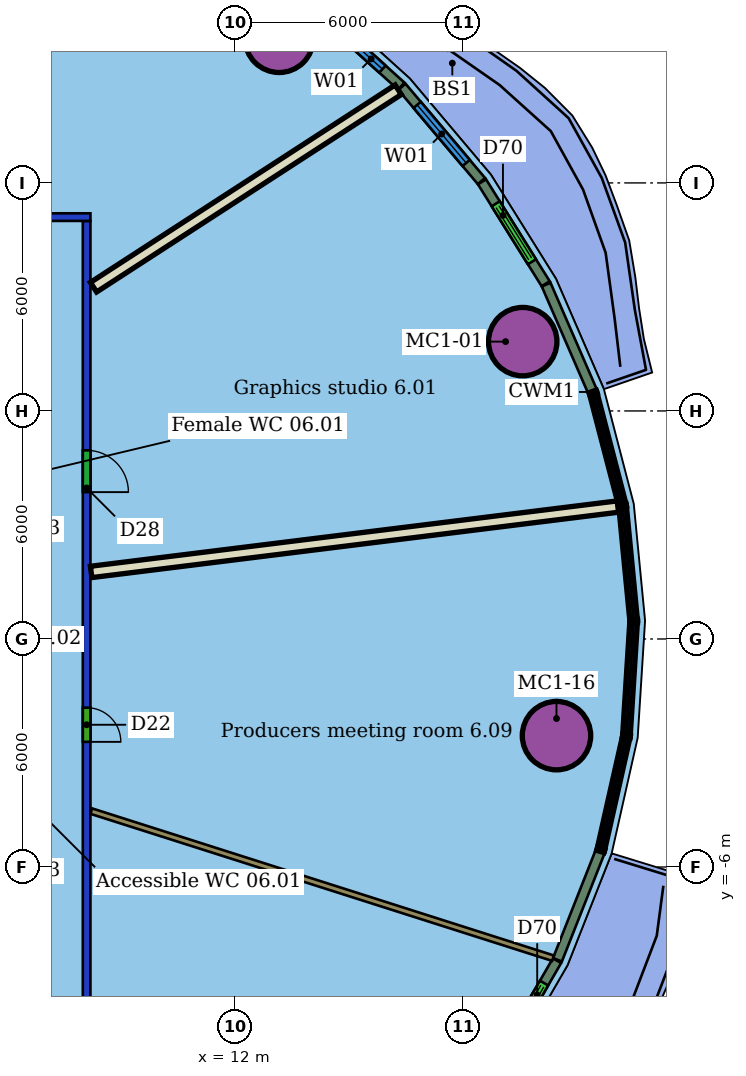
"""IFC4 building model, lengths in metres.
Left out: names, types, materials, properties, quantities, classifications, styles, units other than length and angle.
Written with IfcOpenShell. Run it as: python <this file> out.ifc"""

import sys

from ifc_helpers import new_model, si_unit, direction, frame, frame_2d, origin, origin_2d, place, context, subcontext, project, spatial, rectangle, hollow_circle, extrude, element, fill, save


model = new_model("IFC4")
c1 = context("Model", 3, precision=1e-05, world=origin(), true_north=direction((0.0, 1.0)))
c2 = subcontext(c1, "Body", "Model", "MODEL_VIEW")
j1 = project(units=[si_unit("LENGTHUNIT", "METRE"), si_unit("PLANEANGLEUNIT", "RADIAN")], contexts=[c1])
p1 = place(None, origin())
s1 = spatial("IfcSite", under=j1, at=p1, CompositionType="ELEMENT")
p2 = place(p1, origin())
s2 = spatial("IfcBuilding", under=s1, at=p2, CompositionType="ELEMENT")
p3 = place(p2, frame((0.0, 0.0, 39.7)))
s3 = spatial("IfcBuildingStorey", under=s2, at=p3, CompositionType="ELEMENT", Elevation=39.7)
for number, where, z_axis, x_axis in (
    (1, (19.575, 7.824, 0.0), (0.0, 0.0, 1.0), (1.0, 0.0, 0.0)),
    (2, (13.166, 15.805, 0.0), (0.0, 0.0, 1.0), (1.0, 0.0, 0.0)),
    (3, (20.464, -2.543, 0.0), (0.0, 0.0, 1.0), (1.0, 0.0, 0.0)),
):
    element("IfcColumn", number, at=place(p3, frame(where, z_axis=z_axis, x_axis=x_axis)), inside=s3, PredefinedType="COLUMN", context=c2, shape_type="SweptSolid", body=[
        extrude(hollow_circle(Radius=0.9, WallThickness=0.06, at=origin_2d()), origin(), (0.0, 0.0, 1.0), 3.55),
    ])
p4 = place(p3, frame((-20.2, 11.1, 0.0), z_axis=(0.0, 0.0, 1.0), x_axis=(1.0, 0.0, 0.0)))
e4 = element("IfcWall", 4, at=p4, inside=s3, PredefinedType="PARTITIONING", context=c2, shape_type="SweptSolid", body=[
    extrude(rectangle(XDim=28.4, YDim=0.2, at=frame_2d((14.2, 0.0))), origin(), (0.0, 0.0, 1.0), 2.85),
])
p5 = place(p4, frame((16.718, 0.0, 0.0)))
e5 = element("IfcOpeningElement", 5, at=p5, cuts=e4, PredefinedType="OPENING", context=c2, shape_type="SweptSolid", body=[
    extrude(rectangle(XDim=1.8, YDim=2.1, at=frame_2d((0.9, 1.05))), frame((0.0, 0.11, 0.0), z_axis=(0.0, -1.0, 0.0), x_axis=(1.0, 0.0, 0.0)), (0.0, 0.0, 1.0), 0.22),
])
p6 = place(p4, frame((9.305, 0.0, 0.0)))
e6 = element("IfcOpeningElement", 6, at=p6, cuts=e4, PredefinedType="OPENING", context=c2, shape_type="SweptSolid", body=[
    extrude(rectangle(XDim=1.0, YDim=2.1, at=frame_2d((0.5, 1.05))), frame((0.0, 0.11, 0.0), z_axis=(0.0, -1.0, 0.0), x_axis=(1.0, 0.0, 0.0)), (0.0, 0.0, 1.0), 0.22),
])
p7 = place(p4, frame((4.326, 0.0, 0.0)))
e7 = element("IfcOpeningElement", 7, at=p7, cuts=e4, PredefinedType="OPENING", context=c2, shape_type="SweptSolid", body=[
    extrude(rectangle(XDim=1.8, YDim=2.1, at=frame_2d((0.9, 1.05))), frame((0.0, 0.11, 0.0), z_axis=(0.0, -1.0, 0.0), x_axis=(1.0, 0.0, 0.0)), (0.0, 0.0, 1.0), 0.22),
])
p8 = place(p3, frame((8.1, 11.0, 0.0), z_axis=(0.0, 0.0, 1.0), x_axis=(0.0, -1.0, 0.0)))
e8 = element("IfcWall", 8, at=p8, inside=s3, PredefinedType="PARTITIONING", context=c2, shape_type="SweptSolid", body=[
    extrude(rectangle(XDim=22.0, YDim=0.2, at=frame_2d((11.0, 0.0))), origin(), (0.0, 0.0, 1.0), 2.85),
])
p9 = place(p8, frame((6.036, 0.0, 0.0)))
e9 = element("IfcOpeningElement", 9, at=p9, cuts=e8, PredefinedType="OPENING", context=c2, shape_type="SweptSolid", body=[
    extrude(rectangle(XDim=1.1, YDim=2.1, at=frame_2d((0.55, 1.05))), frame((0.0, 0.11, 0.0), z_axis=(0.0, -1.0, 0.0), x_axis=(1.0, 0.0, 0.0)), (0.0, 0.0, 1.0), 0.22),
])
p10 = place(p8, frame((12.807, 0.0, 0.0)))
e10 = element("IfcOpeningElement", 10, at=p10, cuts=e8, PredefinedType="OPENING", context=c2, shape_type="SweptSolid", body=[
    extrude(rectangle(XDim=0.9, YDim=2.1, at=frame_2d((0.45, 1.05))), frame((0.0, 0.11, 0.0), z_axis=(0.0, -1.0, 0.0), x_axis=(1.0, 0.0, 0.0)), (0.0, 0.0, 1.0), 0.22),
])
p11 = place(p3, frame((22.079, 3.484, 0.0), z_axis=(0.0, 0.0, 1.0), x_axis=(-0.992390679807, -0.123128951237, 0.0)))
e11 = element("IfcWall", 11, at=p11, inside=s3, PredefinedType="PARTITIONING", context=c2, shape_type="SweptSolid", body=[
    extrude(rectangle(XDim=13.967, YDim=0.3, at=frame_2d((6.983, 0.0))), origin(), (0.0, 0.0, 1.0), 3.55),
])
p12 = place(p3, frame((16.299, 14.452, 0.0), z_axis=(0.0, 0.0, 1.0), x_axis=(-0.839170912844, -0.54386779555, 0.0)))
e12 = element("IfcWall", 12, at=p12, inside=s3, PredefinedType="PARTITIONING", context=c2, shape_type="SweptSolid", body=[
    extrude(rectangle(XDim=9.554, YDim=0.3, at=frame_2d((4.777, 0.0))), origin(), (0.0, 0.0, 1.0), 3.55),
])
p13 = place(p3, frame((20.372, -8.399, 0.0), z_axis=(0.0, 0.0, 1.0), x_axis=(-0.95285006043, 0.303441530346, 0.0)))
e13 = element("IfcWall", 13, at=p13, inside=s3, PredefinedType="PARTITIONING", context=c2, shape_type="SweptSolid", body=[
    extrude(rectangle(XDim=12.751, YDim=0.15, at=frame_2d((6.375, 0.0))), origin(), (0.0, 0.0, 1.0), 3.55),
])
p14 = place(p3, frame((21.406, 6.526, 0.0), z_axis=(0.0, 0.0, 1.0), x_axis=(-0.398117264061, 0.917334532249, 0.0)))
e14 = element("IfcWall", 14, at=p14, inside=s3, PredefinedType="SOLIDWALL", context=c2, shape_type="SweptSolid", body=[
    extrude(rectangle(XDim=3.05, YDim=0.25, at=frame_2d((1.525, 0.0))), origin(), (0.0, 0.0, 1.0), 3.15),
])
p15 = place(p3, frame((20.18, 9.347, 0.0), z_axis=(0.0, 0.0, 1.0), x_axis=(-0.529936462225, 0.848037349416, 0.0)))
e15 = element("IfcWall", 15, at=p15, inside=s3, PredefinedType="SOLIDWALL", context=c2, shape_type="SweptSolid", body=[
    extrude(rectangle(XDim=3.161, YDim=0.25, at=frame_2d((1.581, 0.0))), origin(), (0.0, 0.0, 1.0), 3.15),
])
p16 = place(p15, frame((0.681, 0.0, 0.0)))
e16 = element("IfcOpeningElement", 16, at=p16, cuts=e15, PredefinedType="OPENING", context=c2, shape_type="SweptSolid", body=[
    extrude(rectangle(XDim=1.8, YDim=2.4, at=frame_2d((0.9, 1.2))), frame((0.0, 0.135, 0.0), z_axis=(0.0, -1.0, 0.0), x_axis=(1.0, 0.0, 0.0)), (0.0, 0.0, 1.0), 0.27),
])
p17 = place(p3, frame((18.489, 12.049, 0.0), z_axis=(0.0, 0.0, 1.0), x_axis=(-0.644879179912, 0.76428453034, 0.0)))
e17 = element("IfcWall", 17, at=p17, inside=s3, PredefinedType="SOLIDWALL", context=c2, shape_type="SweptSolid", body=[
    extrude(rectangle(XDim=3.245, YDim=0.25, at=frame_2d((1.623, 0.0))), origin(), (0.0, 0.0, 1.0), 3.15),
])
p18 = place(p17, frame((0.622, 0.0, 0.8)))
e18 = element("IfcOpeningElement", 18, at=p18, cuts=e17, PredefinedType="OPENING", context=c2, shape_type="SweptSolid", body=[
    extrude(rectangle(XDim=2.0, YDim=2.2, at=frame_2d((1.0, 1.1))), frame((0.0, 0.135, 0.0), z_axis=(0.0, -1.0, 0.0), x_axis=(1.0, 0.0, 0.0)), (0.0, 0.0, 1.0), 0.27),
])
p19 = place(p3, frame((16.379, 14.547, 0.0), z_axis=(0.0, 0.0, 1.0), x_axis=(-0.741993404353, 0.670407180672, 0.0)))
e19 = element("IfcWall", 19, at=p19, inside=s3, PredefinedType="SOLIDWALL", context=c2, shape_type="SweptSolid", body=[
    extrude(rectangle(XDim=3.335, YDim=0.25, at=frame_2d((1.668, 0.0))), origin(), (0.0, 0.0, 1.0), 3.15),
])
p20 = place(p19, frame((0.668, 0.0, 0.8)))
e20 = element("IfcOpeningElement", 20, at=p20, cuts=e19, PredefinedType="OPENING", context=c2, shape_type="SweptSolid", body=[
    extrude(rectangle(XDim=2.0, YDim=2.2, at=frame_2d((1.0, 1.1))), frame((0.0, 0.135, 0.0), z_axis=(0.0, -1.0, 0.0), x_axis=(1.0, 0.0, 0.0)), (0.0, 0.0, 1.0), 0.27),
])
p21 = place(p3, frame((18.894, -11.2, 0.0), z_axis=(0.0, 0.0, 1.0), x_axis=(0.501203693301, 0.86532933489, 0.0)))
e21 = element("IfcWall", 21, at=p21, inside=s3, PredefinedType="SOLIDWALL", context=c2, shape_type="SweptSolid", body=[
    extrude(rectangle(XDim=3.161, YDim=0.25, at=frame_2d((1.581, 0.0))), origin(), (0.0, 0.0, 1.0), 3.15),
])
p22 = place(p21, frame((0.681, 0.0, 0.0)))
e22 = element("IfcOpeningElement", 22, at=p22, cuts=e21, PredefinedType="OPENING", context=c2, shape_type="SweptSolid", body=[
    extrude(rectangle(XDim=1.8, YDim=2.4, at=frame_2d((0.9, 1.2))), frame((0.0, 0.135, 0.0), z_axis=(0.0, -1.0, 0.0), x_axis=(1.0, 0.0, 0.0)), (0.0, 0.0, 1.0), 0.27),
])
p23 = place(p3, frame((20.49, -8.441, 0.0), z_axis=(0.0, 0.0, 1.0), x_axis=(0.367150133135, 0.93016169548, 0.0)))
e23 = element("IfcWall", 23, at=p23, inside=s3, PredefinedType="SOLIDWALL", context=c2, shape_type="SweptSolid", body=[
    extrude(rectangle(XDim=3.05, YDim=0.25, at=frame_2d((1.525, 0.0))), origin(), (0.0, 0.0, 1.0), 3.15),
])
p24 = place(p9, origin())
e24 = element("IfcDoor", 24, at=p24, inside=s3, OperationType="SINGLE_SWING_RIGHT", PredefinedType="DOOR", context=c2, shape_type="SweptSolid", body=[
    extrude(rectangle(XDim=1.1, YDim=2.1, at=frame_2d((0.55, 1.05))), frame((0.0, 0.025, 0.0), z_axis=(0.0, -1.0, 0.0), x_axis=(1.0, 0.0, 0.0)), (0.0, 0.0, 1.0), 0.05),
])
fill(e9, e24)
p25 = place(p10, origin())
e25 = element("IfcDoor", 25, at=p25, inside=s3, OperationType="SINGLE_SWING_RIGHT", PredefinedType="DOOR", context=c2, shape_type="SweptSolid", body=[
    extrude(rectangle(XDim=0.9, YDim=2.1, at=frame_2d((0.45, 1.05))), frame((0.0, 0.025, 0.0), z_axis=(0.0, -1.0, 0.0), x_axis=(1.0, 0.0, 0.0)), (0.0, 0.0, 1.0), 0.05),
])
fill(e10, e25)
p26 = place(p16, origin())
e26 = element("IfcDoor", 26, at=p26, inside=s3, OperationType="DOUBLE_DOOR_SLIDING", PredefinedType="DOOR", context=c2, shape_type="SweptSolid", body=[
    extrude(rectangle(XDim=1.8, YDim=2.4, at=frame_2d((0.9, 1.2))), frame((0.0, 0.025, 0.0), z_axis=(0.0, -1.0, 0.0), x_axis=(1.0, 0.0, 0.0)), (0.0, 0.0, 1.0), 0.05),
])
fill(e16, e26)
p27 = place(p18, origin())
e27 = element("IfcWindow", 27, at=p27, inside=s3, PartitioningType="SINGLE_PANEL", PredefinedType="WINDOW", context=c2, shape_type="SweptSolid", body=[
    extrude(rectangle(XDim=2.0, YDim=2.2, at=frame_2d((1.0, 1.1))), frame((0.0, 0.03, 0.0), z_axis=(0.0, -1.0, 0.0), x_axis=(1.0, 0.0, 0.0)), (0.0, 0.0, 1.0), 0.06),
])
fill(e18, e27)
p28 = place(p20, origin())
e28 = element("IfcWindow", 28, at=p28, inside=s3, PartitioningType="SINGLE_PANEL", PredefinedType="WINDOW", context=c2, shape_type="SweptSolid", body=[
    extrude(rectangle(XDim=2.0, YDim=2.2, at=frame_2d((1.0, 1.1))), frame((0.0, 0.03, 0.0), z_axis=(0.0, -1.0, 0.0), x_axis=(1.0, 0.0, 0.0)), (0.0, 0.0, 1.0), 0.06),
])
fill(e20, e28)
p29 = place(p22, origin())
e29 = element("IfcDoor", 29, at=p29, inside=s3, OperationType="DOUBLE_DOOR_SLIDING", PredefinedType="DOOR", context=c2, shape_type="SweptSolid", body=[
    extrude(rectangle(XDim=1.8, YDim=2.4, at=frame_2d((0.9, 1.2))), frame((0.0, 0.025, 0.0), z_axis=(0.0, -1.0, 0.0), x_axis=(1.0, 0.0, 0.0)), (0.0, 0.0, 1.0), 0.05),
])
fill(e22, e29)
save(model, sys.argv[1])
